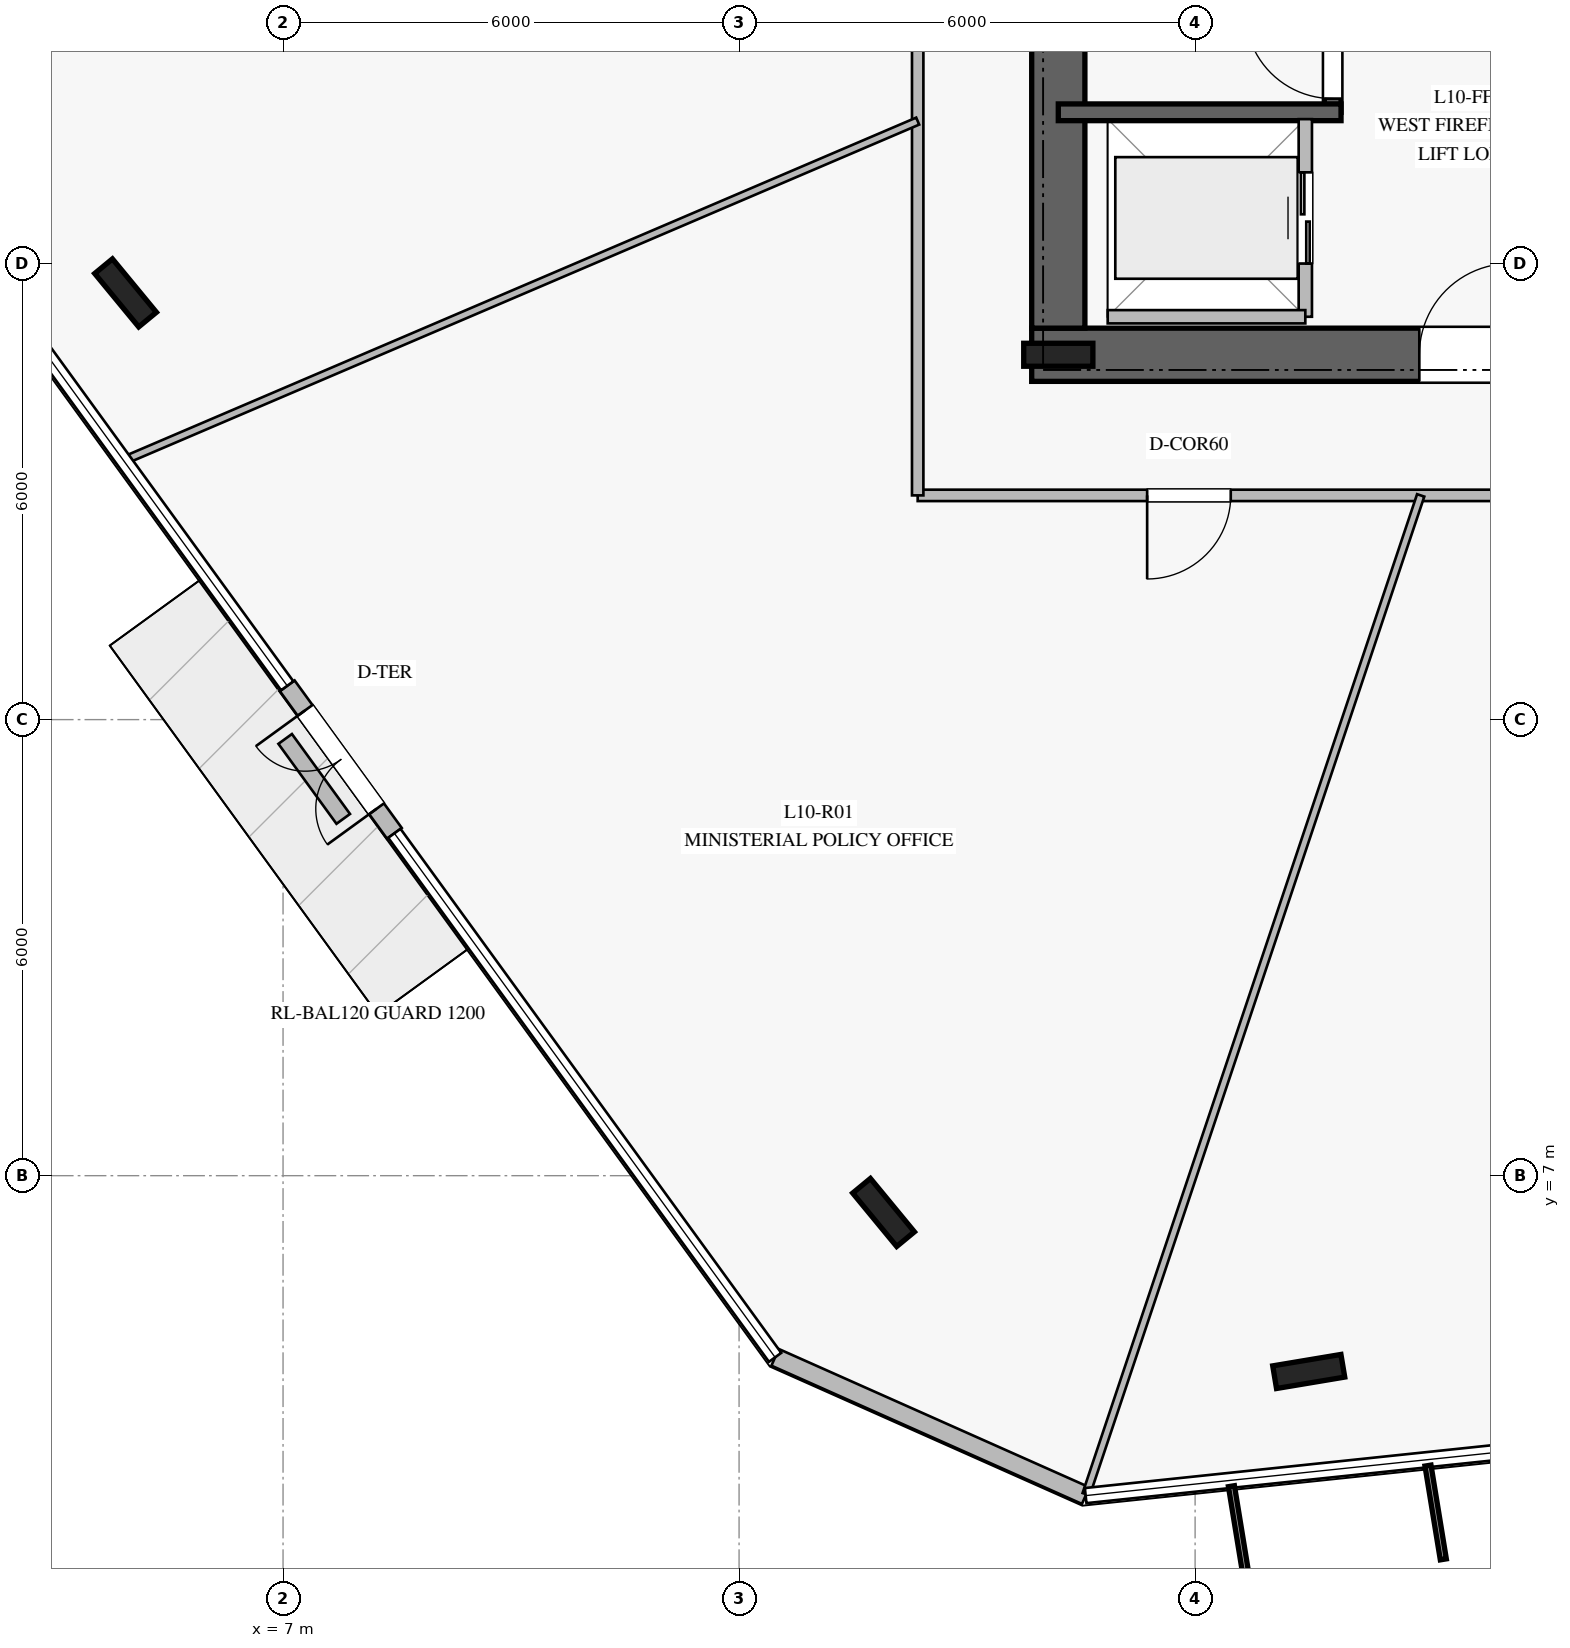
"""IFC4 building model, lengths in metres.
Left out: names, types, materials, properties, quantities, classifications, styles, units other than length and angle.
Written with IfcOpenShell. Run it as: python <this file> out.ifc"""

import sys

from ifc_helpers import new_model, si_unit, direction, frame, frame_2d, origin, origin_2d, place, context, subcontext, project, spatial, rectangle, i_section, extrude, element, fill, save


model = new_model("IFC4")
c1 = context("Model", 3, precision=1e-05, world=origin(), true_north=direction((0.0, 1.0)))
c2 = subcontext(c1, "Body", "Model", "MODEL_VIEW")
j1 = project(units=[si_unit("LENGTHUNIT", "METRE"), si_unit("PLANEANGLEUNIT", "RADIAN")], contexts=[c1])
p1 = place(None, origin())
s1 = spatial("IfcSite", under=j1, at=p1, CompositionType="ELEMENT")
p2 = place(p1, origin())
s2 = spatial("IfcBuilding", under=s1, at=p2, CompositionType="ELEMENT")
p3 = place(p2, frame((0.0, 0.0, 44.0)))
s3 = spatial("IfcBuildingStorey", under=s2, at=p3, CompositionType="ELEMENT", Elevation=44.0)
p4 = place(p3, frame((16.85, 17.8, 0.0), z_axis=(0.0, 0.0, 1.0), x_axis=(1.0, 0.0, 0.0)))
e1 = element("IfcWall", 1, at=p4, inside=s3, PredefinedType="SHEAR", context=c2, shape_type="SweptSolid", body=[
    extrude(rectangle(XDim=16.3, YDim=0.7, at=frame_2d((8.15, 0.0))), origin(), (0.0, 0.0, 1.0), 3.76),
])
p5 = place(p4, frame((5.1, 0.0, 0.0)))
e2 = element("IfcOpeningElement", 2, at=p5, cuts=e1, PredefinedType="OPENING", context=c2, shape_type="SweptSolid", body=[
    extrude(rectangle(XDim=1.2, YDim=2.25, at=frame_2d((0.6, 1.125))), frame((0.0, 0.36, 0.0), z_axis=(0.0, -1.0, 0.0), x_axis=(1.0, 0.0, 0.0)), (0.0, 0.0, 1.0), 0.72),
])
p6 = place(p4, frame((14.05, 0.0, 0.0)))
e3 = element("IfcOpeningElement", 3, at=p6, cuts=e1, PredefinedType="OPENING", context=c2, shape_type="SweptSolid", body=[
    extrude(rectangle(XDim=0.9, YDim=2.1, at=frame_2d((0.45, 1.05))), frame((0.0, 0.36, 0.0), z_axis=(0.0, -1.0, 0.0), x_axis=(1.0, 0.0, 0.0)), (0.0, 0.0, 1.0), 0.72),
])
p7 = place(p4, frame((7.95, 0.0, 0.0)))
e4 = element("IfcOpeningElement", 4, at=p7, cuts=e1, PredefinedType="OPENING", context=c2, shape_type="SweptSolid", body=[
    extrude(rectangle(XDim=1.1, YDim=2.2, at=frame_2d((0.55, 1.1))), frame((0.0, 0.36, 0.0), z_axis=(0.0, -1.0, 0.0), x_axis=(1.0, 0.0, 0.0)), (0.0, 0.0, 1.0), 0.72),
])
p8 = place(p4, frame((9.925, 0.0, 0.0)))
e5 = element("IfcOpeningElement", 5, at=p8, cuts=e1, PredefinedType="OPENING", context=c2, shape_type="SweptSolid", body=[
    extrude(rectangle(XDim=1.1, YDim=2.2, at=frame_2d((0.55, 1.1))), frame((0.0, 0.36, 0.0), z_axis=(0.0, -1.0, 0.0), x_axis=(1.0, 0.0, 0.0)), (0.0, 0.0, 1.0), 0.72),
])
p9 = place(p4, frame((11.9, 0.0, 0.0)))
e6 = element("IfcOpeningElement", 6, at=p9, cuts=e1, PredefinedType="OPENING", context=c2, shape_type="SweptSolid", body=[
    extrude(rectangle(XDim=1.1, YDim=2.2, at=frame_2d((0.55, 1.1))), frame((0.0, 0.36, 0.0), z_axis=(0.0, -1.0, 0.0), x_axis=(1.0, 0.0, 0.0)), (0.0, 0.0, 1.0), 0.72),
])
p10 = place(p3, frame((17.2, 31.85, 0.0), z_axis=(0.0, 0.0, 1.0), x_axis=(0.0, -1.0, 0.0)))
e7 = element("IfcWall", 7, at=p10, inside=s3, PredefinedType="SHEAR", context=c2, shape_type="SweptSolid", body=[
    extrude(rectangle(XDim=13.7, YDim=0.7, at=frame_2d((6.85, 0.0))), origin(), (0.0, 0.0, 1.0), 3.76),
])
p11 = place(p10, frame((2.0, 0.0, 0.0)))
e8 = element("IfcOpeningElement", 8, at=p11, cuts=e7, PredefinedType="OPENING", context=c2, shape_type="SweptSolid", body=[
    extrude(rectangle(XDim=1.5, YDim=2.2, at=frame_2d((0.75, 1.1))), frame((0.0, 0.36, 0.0), z_axis=(0.0, -1.0, 0.0), x_axis=(1.0, 0.0, 0.0)), (0.0, 0.0, 1.0), 0.72),
])
p12 = place(p3, frame((17.2, 17.8, 0.0), z_axis=(0.0, 0.0, 1.0), x_axis=(1.0, 0.0, 0.0)))
e9 = element("IfcColumn", 9, at=p12, inside=s3, PredefinedType="COLUMN", context=c2, shape_type="SweptSolid", body=[
    extrude(i_section(OverallWidth=0.302, OverallDepth=0.91, WebThickness=0.021, FlangeThickness=0.04, at=origin_2d()), origin(), (0.0, 0.0, 1.0), 4.0),
])
p13 = place(p3, frame((20.81, 20.99, 0.0), z_axis=(0.0, 0.0, 1.0), x_axis=(0.0, 1.0, 0.0)))
e10 = element("IfcWall", 10, at=p13, inside=s3, PredefinedType="SOLIDWALL", context=c2, shape_type="SweptSolid", body=[
    extrude(rectangle(XDim=7.22, YDim=0.22, at=frame_2d((3.61, 0.0))), origin(), (0.0, 0.0, 1.0), 3.76),
])
p14 = place(p13, frame((0.18, 0.0, 0.0)))
e11 = element("IfcOpeningElement", 11, at=p14, cuts=e10, PredefinedType="OPENING", context=c2, shape_type="SweptSolid", body=[
    extrude(rectangle(XDim=1.15, YDim=2.2, at=frame_2d((0.575, 1.1))), frame((0.0, 0.12, 0.0), z_axis=(0.0, -1.0, 0.0), x_axis=(1.0, 0.0, 0.0)), (0.0, 0.0, 1.0), 0.24),
])
p15 = place(p3, frame((17.2, 20.99, 0.0), z_axis=(0.0, 0.0, 1.0), x_axis=(1.0, 0.0, 0.0)))
e12 = element("IfcWall", 12, at=p15, inside=s3, PredefinedType="SOLIDWALL", context=c2, shape_type="SweptSolid", body=[
    extrude(rectangle(XDim=3.72, YDim=0.22, at=frame_2d((1.86, 0.0))), origin(), (0.0, 0.0, 1.0), 3.76),
])
for number, where, z_axis, x_axis in (
    (13, (4.928, 18.614, 0.0), (0.0, 0.0, 1.0), (-0.636, 0.772, 0.0)),
    (14, (14.901, 6.516, 0.0), (0.0, 0.0, 1.0), (-0.636, 0.772, 0.0)),
    (15, (20.495, 4.424, 0.0), (0.0, 0.0, 1.0), (0.986, 0.165, 0.0)),
):
    element("IfcColumn", number, at=place(p3, frame(where, z_axis=z_axis, x_axis=x_axis)), inside=s3, PredefinedType="COLUMN", context=c2, shape_type="SweptSolid", body=[
        extrude(i_section(OverallWidth=0.302, OverallDepth=0.91, WebThickness=0.021, FlangeThickness=0.04, at=origin_2d()), origin(), (0.0, 0.0, 1.0), 4.0),
    ])
p16 = place(p3, frame((7.055, 13.445, 0.0), z_axis=(0.0, 0.0, 1.0), x_axis=(0.587735991603, -0.80905278207, 0.0)))
e16 = element("IfcWall", 16, at=p16, inside=s3, PredefinedType="STANDARD", context=c2, shape_type="SweptSolid", body=[
    extrude(rectangle(XDim=2.399, YDim=0.24, at=frame_2d((1.2, 0.0))), origin(), (0.0, 0.0, 1.0), 3.76),
])
p17 = place(p16, frame((0.4, 0.0, 0.0)))
e17 = element("IfcOpeningElement", 17, at=p17, cuts=e16, PredefinedType="OPENING", context=c2, shape_type="SweptSolid", body=[
    extrude(rectangle(XDim=1.6, YDim=2.25, at=frame_2d((0.8, 1.125))), frame((0.0, 0.13, 0.0), z_axis=(0.0, -1.0, 0.0), x_axis=(1.0, 0.0, 0.0)), (0.0, 0.0, 1.0), 0.26),
])
p18 = place(p3, frame((13.474, 4.61, 0.0), z_axis=(0.0, 0.0, 1.0), x_axis=(0.91355250122, -0.406720822573, 0.0)))
e18 = element("IfcWall", 18, at=p18, inside=s3, PredefinedType="STANDARD", context=c2, shape_type="SweptSolid", body=[
    extrude(rectangle(XDim=4.473, YDim=0.24, at=frame_2d((2.236, 0.0))), origin(), (0.0, 0.0, 1.0), 3.76),
])
p19 = place(p3, frame((7.028, 12.746, 0.0), z_axis=(0.0, 0.0, 1.0), x_axis=(0.587579763197, -0.809166251076, 0.0)))
e19 = element("IfcWall", 19, at=p19, inside=s3, PredefinedType="USERDEFINED", context=c2, shape_type="SweptSolid", body=[
    extrude(rectangle(XDim=1.3, YDim=0.22, at=frame_2d((0.65, 0.0))), origin(), (0.0, 0.0, 1.0), 0.4),
])
p20 = place(p3, frame((20.45, 18.3, 0.0), z_axis=(0.0, 0.0, 1.0), x_axis=(0.0, 1.0, 0.0)))
e20 = element("IfcWall", 20, at=p20, inside=s3, PredefinedType="PARTITIONING", context=c2, shape_type="SweptSolid", body=[
    extrude(rectangle(XDim=2.6, YDim=0.175, at=frame_2d((1.3, 0.0))), origin(), (0.0, 0.0, 1.0), 3.76),
])
p21 = place(p20, frame((0.7, 0.0, 0.0)))
e21 = element("IfcOpeningElement", 21, at=p21, cuts=e20, PredefinedType="OPENING", context=c2, shape_type="SweptSolid", body=[
    extrude(rectangle(XDim=1.2, YDim=2.2, at=frame_2d((0.6, 1.1))), frame((0.0, 0.098, 0.0), z_axis=(0.0, -1.0, 0.0), x_axis=(1.0, 0.0, 0.0)), (0.0, 0.0, 1.0), 0.195),
])
p22 = place(p3, frame((17.85, 18.3, 0.0), z_axis=(0.0, 0.0, 1.0), x_axis=(1.0, 0.0, 0.0)))
e22 = element("IfcWall", 22, at=p22, inside=s3, PredefinedType="PARTITIONING", context=c2, shape_type="SweptSolid", body=[
    extrude(rectangle(XDim=2.6, YDim=0.175, at=frame_2d((1.3, 0.0))), origin(), (0.0, 0.0, 1.0), 3.76),
])
p23 = place(p3, frame((34.65, 15.95, 0.0), z_axis=(0.0, 0.0, 1.0), x_axis=(-1.0, 0.0, 0.0)))
e23 = element("IfcWall", 23, at=p23, inside=s3, PredefinedType="PARTITIONING", context=c2, shape_type="SweptSolid", body=[
    extrude(rectangle(XDim=19.3, YDim=0.15, at=frame_2d((9.65, 0.0))), origin(), (0.0, 0.0, 1.0), 3.21),
])
p24 = place(p23, frame((15.181, 0.0, 0.0)))
e24 = element("IfcOpeningElement", 24, at=p24, cuts=e23, PredefinedType="OPENING", context=c2, shape_type="SweptSolid", body=[
    extrude(rectangle(XDim=1.1, YDim=2.2, at=frame_2d((0.55, 1.1))), frame((0.0, 0.085, 0.0), z_axis=(0.0, -1.0, 0.0), x_axis=(1.0, 0.0, 0.0)), (0.0, 0.0, 1.0), 0.17),
])
p25 = place(p23, frame((6.497, 0.0, 0.0)))
e25 = element("IfcOpeningElement", 25, at=p25, cuts=e23, PredefinedType="OPENING", context=c2, shape_type="SweptSolid", body=[
    extrude(rectangle(XDim=1.1, YDim=2.2, at=frame_2d((0.55, 1.1))), frame((0.0, 0.085, 0.0), z_axis=(0.0, -1.0, 0.0), x_axis=(1.0, 0.0, 0.0)), (0.0, 0.0, 1.0), 0.17),
])
p26 = place(p3, frame((15.35, 15.95, 0.0), z_axis=(0.0, 0.0, 1.0), x_axis=(0.0, 1.0, 0.0)))
e26 = element("IfcWall", 26, at=p26, inside=s3, PredefinedType="PARTITIONING", context=c2, shape_type="SweptSolid", body=[
    extrude(rectangle(XDim=18.1, YDim=0.15, at=frame_2d((9.05, 0.0))), origin(), (0.0, 0.0, 1.0), 3.21),
])
p27 = place(p26, frame((10.07, 0.0, 0.0)))
e27 = element("IfcOpeningElement", 27, at=p27, cuts=e26, PredefinedType="OPENING", context=c2, shape_type="SweptSolid", body=[
    extrude(rectangle(XDim=1.1, YDim=2.2, at=frame_2d((0.55, 1.1))), frame((0.0, 0.085, 0.0), z_axis=(0.0, -1.0, 0.0), x_axis=(1.0, 0.0, 0.0)), (0.0, 0.0, 1.0), 0.17),
])
p28 = place(p3, frame((15.35, 20.874, 0.0), z_axis=(0.0, 0.0, 1.0), x_axis=(-0.919467552989, -0.393165892468, 0.0)))
e28 = element("IfcWall", 28, at=p28, inside=s3, PredefinedType="MOVABLE", context=c2, shape_type="SweptSolid", body=[
    extrude(rectangle(XDim=11.344, YDim=0.1, at=frame_2d((5.672, 0.0))), origin(), (0.0, 0.0, 1.0), 3.06),
])
p29 = place(p3, frame((21.968, 15.95, 0.0), z_axis=(0.0, 0.0, 1.0), x_axis=(-0.317580424763, -0.948231339815, 0.0)))
e29 = element("IfcWall", 29, at=p29, inside=s3, PredefinedType="MOVABLE", context=c2, shape_type="SweptSolid", body=[
    extrude(rectangle(XDim=13.858, YDim=0.1, at=frame_2d((6.929, 0.0))), origin(), (0.0, 0.0, 1.0), 3.05),
])
p30 = place(p17, frame((1.6, 0.0, 0.0), z_axis=(0.0, 0.0, 1.0), x_axis=(-1.0, 0.0, 0.0)))
e30 = element("IfcDoor", 30, at=p30, inside=s3, OperationType="DOUBLE_DOOR_SINGLE_SWING", PredefinedType="DOOR", context=c2, shape_type="SweptSolid", body=[
    extrude(rectangle(XDim=1.6, YDim=2.25, at=frame_2d((0.8, 1.125))), frame((0.0, 0.025, 0.0), z_axis=(0.0, -1.0, 0.0), x_axis=(1.0, 0.0, 0.0)), (0.0, 0.0, 1.0), 0.05),
])
fill(e17, e30)
p31 = place(p14, origin())
e31 = element("IfcDoor", 31, at=p31, inside=s3, OperationType="SINGLE_SWING_RIGHT", PredefinedType="DOOR", context=c2, shape_type="SweptSolid", body=[
    extrude(rectangle(XDim=1.15, YDim=2.2, at=frame_2d((0.575, 1.1))), frame((0.0, 0.025, 0.0), z_axis=(0.0, -1.0, 0.0), x_axis=(1.0, 0.0, 0.0)), (0.0, 0.0, 1.0), 0.05),
])
fill(e11, e31)
p32 = place(p5, origin())
e32 = element("IfcDoor", 32, at=p32, inside=s3, OperationType="SINGLE_SWING_RIGHT", PredefinedType="DOOR", context=c2, shape_type="SweptSolid", body=[
    extrude(rectangle(XDim=1.2, YDim=2.25, at=frame_2d((0.6, 1.125))), frame((0.0, 0.025, 0.0), z_axis=(0.0, -1.0, 0.0), x_axis=(1.0, 0.0, 0.0)), (0.0, 0.0, 1.0), 0.05),
])
fill(e2, e32)
p33 = place(p21, origin())
e33 = element("IfcDoor", 33, at=p33, inside=s3, OperationType="DOUBLE_DOOR_SLIDING", PredefinedType="DOOR", context=c2, shape_type="SweptSolid", body=[
    extrude(rectangle(XDim=1.2, YDim=2.2, at=frame_2d((0.6, 1.1))), frame((0.0, 0.025, 0.0), z_axis=(0.0, -1.0, 0.0), x_axis=(1.0, 0.0, 0.0)), (0.0, 0.0, 1.0), 0.05),
])
fill(e21, e33)
p34 = place(p24, origin())
e34 = element("IfcDoor", 34, at=p34, inside=s3, OperationType="SINGLE_SWING_RIGHT", PredefinedType="DOOR", context=c2, shape_type="SweptSolid", body=[
    extrude(rectangle(XDim=1.1, YDim=2.2, at=frame_2d((0.55, 1.1))), frame((0.0, 0.025, 0.0), z_axis=(0.0, -1.0, 0.0), x_axis=(1.0, 0.0, 0.0)), (0.0, 0.0, 1.0), 0.05),
])
fill(e24, e34)
save(model, sys.argv[1])
